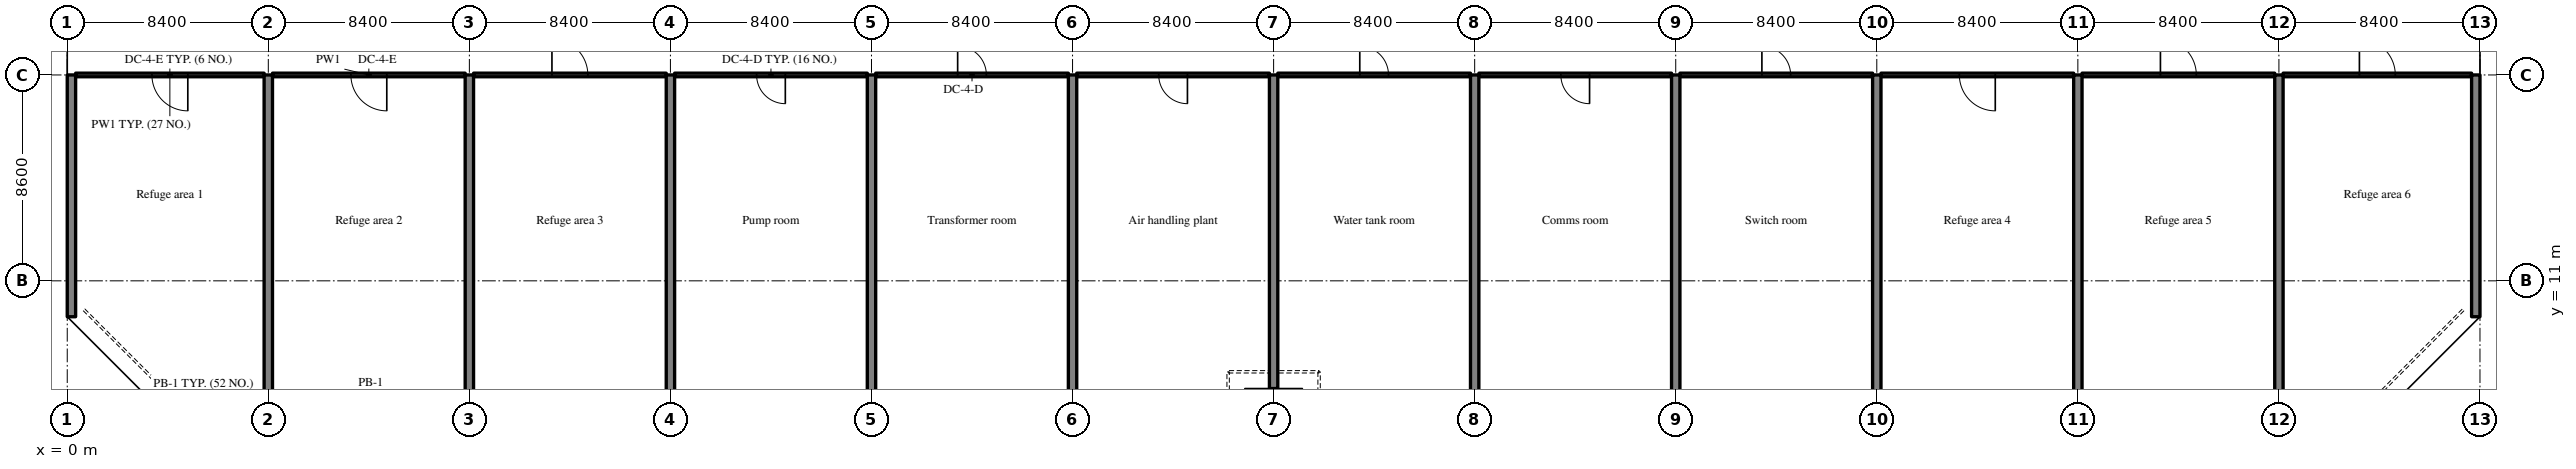
"""IFC4 building model, lengths in metres.
Left out: names, types, materials, properties, quantities, classifications, styles, units other than length and angle.
Written with IfcOpenShell. Run it as: python <this file> out.ifc"""

import sys

from ifc_helpers import new_model, si_unit, direction, frame, frame_2d, origin, place, context, subcontext, project, spatial, rectangle, extrude, source, transform, mapped, element, fill, save


model = new_model("IFC4")
c1 = context("Model", 3, precision=1e-05, world=origin(), true_north=direction((0.0, 1.0)))
c2 = subcontext(c1, "Body", "Model", "MODEL_VIEW")
j1 = project(units=[si_unit("LENGTHUNIT", "METRE"), si_unit("PLANEANGLEUNIT", "RADIAN")], contexts=[c1])
p1 = place(None, origin())
s1 = spatial("IfcSite", under=j1, at=p1, CompositionType="ELEMENT")
p2 = place(p1, origin())
s2 = spatial("IfcBuilding", under=s1, at=p2, CompositionType="ELEMENT")
p3 = place(p2, frame((0.0, 0.0, 140.8)))
s3 = spatial("IfcBuildingStorey", under=s2, at=p3, CompositionType="ELEMENT", Elevation=140.8)
m1 = source(origin(), c2, "Body", "SweptSolid", [
    extrude(rectangle(XDim=10.1, YDim=0.35, at=frame_2d((5.05, 0.0))), origin(), (0.0, 0.0, 1.0), 5.12),
])
p4 = place(p3, frame((0.175, 9.5, 0.0), z_axis=(0.0, 0.0, 1.0), x_axis=(0.0, 1.0, 0.0)))
e1 = element("IfcWall", 1, at=p4, inside=s3, PredefinedType="SHEAR", context=c2, shape_type="MappedRepresentation", body=[
    mapped(m1, transform((0.0, 0.0, 0.0), scale=1.0)),
])
m2 = source(origin(), c2, "Body", "SweptSolid", [
    extrude(rectangle(XDim=14.1, YDim=0.35, at=frame_2d((7.05, 0.0))), origin(), (0.0, 0.0, 1.0), 5.12),
])
for number, where, z_axis, x_axis in (
    (2, (8.4, 5.5, 0.0), (0.0, 0.0, 1.0), (0.0, 1.0, 0.0)),
    (3, (16.8, 5.5, 0.0), (0.0, 0.0, 1.0), (0.0, 1.0, 0.0)),
    (4, (25.2, 5.5, 0.0), (0.0, 0.0, 1.0), (0.0, 1.0, 0.0)),
    (5, (33.6, 5.5, 0.0), (0.0, 0.0, 1.0), (0.0, 1.0, 0.0)),
    (6, (42.0, 5.5, 0.0), (0.0, 0.0, 1.0), (0.0, 1.0, 0.0)),
):
    element("IfcWall", number, at=place(p3, frame(where, z_axis=z_axis, x_axis=x_axis)), inside=s3, PredefinedType="SHEAR", context=c2, shape_type="MappedRepresentation", body=[
        mapped(m2, transform((0.0, 0.0, 0.0), scale=1.0)),
    ])
m3 = source(origin(), c2, "Body", "SweptSolid", [
    extrude(rectangle(XDim=13.1, YDim=0.35, at=frame_2d((6.55, 0.0))), origin(), (0.0, 0.0, 1.0), 5.12),
])
p5 = place(p3, frame((50.4, 6.5, 0.0), z_axis=(0.0, 0.0, 1.0), x_axis=(0.0, 1.0, 0.0)))
e7 = element("IfcWall", 7, at=p5, inside=s3, PredefinedType="SHEAR", context=c2, shape_type="MappedRepresentation", body=[
    mapped(m3, transform((0.0, 0.0, 0.0), scale=1.0)),
])
for number, where, z_axis, x_axis in (
    (8, (58.8, 5.5, 0.0), (0.0, 0.0, 1.0), (0.0, 1.0, 0.0)),
    (9, (67.2, 5.5, 0.0), (0.0, 0.0, 1.0), (0.0, 1.0, 0.0)),
    (10, (75.6, 5.5, 0.0), (0.0, 0.0, 1.0), (0.0, 1.0, 0.0)),
    (11, (84.0, 5.5, 0.0), (0.0, 0.0, 1.0), (0.0, 1.0, 0.0)),
    (12, (92.4, 5.5, 0.0), (0.0, 0.0, 1.0), (0.0, 1.0, 0.0)),
):
    element("IfcWall", number, at=place(p3, frame(where, z_axis=z_axis, x_axis=x_axis)), inside=s3, PredefinedType="SHEAR", context=c2, shape_type="MappedRepresentation", body=[
        mapped(m2, transform((0.0, 0.0, 0.0), scale=1.0)),
    ])
p6 = place(p3, frame((100.625, 9.5, 0.0), z_axis=(0.0, 0.0, 1.0), x_axis=(0.0, 1.0, 0.0)))
e13 = element("IfcWall", 13, at=p6, inside=s3, PredefinedType="SHEAR", context=c2, shape_type="MappedRepresentation", body=[
    mapped(m1, transform((0.0, 0.0, 0.0), scale=1.0)),
])
m4 = source(origin(), c2, "Body", "SweptSolid", [
    extrude(rectangle(XDim=7.875, YDim=0.15, at=frame_2d((3.938, 0.0))), origin(), (0.0, 0.0, 1.0), 4.37),
])
p7 = place(p3, frame((0.35, 19.6, 0.0), z_axis=(0.0, 0.0, 1.0), x_axis=(1.0, 0.0, 0.0)))
e14 = element("IfcWall", 14, at=p7, inside=s3, PredefinedType="PARTITIONING", context=c2, shape_type="MappedRepresentation", body=[
    mapped(m4, transform((0.0, 0.0, 0.0), scale=1.0)),
])
m5 = source(origin(), c2, "Body", "SweptSolid", [
    extrude(rectangle(XDim=1.5, YDim=2.1, at=frame_2d((0.75, 1.05))), frame((0.0, 0.085, 0.0), z_axis=(0.0, -1.0, 0.0), x_axis=(1.0, 0.0, 0.0)), (0.0, 0.0, 1.0), 0.17),
])
p8 = place(p7, frame((3.187, 0.0, 0.0)))
e15 = element("IfcOpeningElement", 15, at=p8, cuts=e14, PredefinedType="OPENING", context=c2, shape_type="MappedRepresentation", body=[
    mapped(m5, transform((0.0, 0.0, 0.0), scale=1.0)),
])
m6 = source(origin(), c2, "Body", "SweptSolid", [
    extrude(rectangle(XDim=8.05, YDim=0.15, at=frame_2d((4.025, 0.0))), origin(), (0.0, 0.0, 1.0), 4.37),
])
p9 = place(p3, frame((8.575, 19.6, 0.0), z_axis=(0.0, 0.0, 1.0), x_axis=(1.0, 0.0, 0.0)))
e16 = element("IfcWall", 16, at=p9, inside=s3, PredefinedType="PARTITIONING", context=c2, shape_type="MappedRepresentation", body=[
    mapped(m6, transform((0.0, 0.0, 0.0), scale=1.0)),
])
p10 = place(p9, frame((3.275, 0.0, 0.0)))
e17 = element("IfcOpeningElement", 17, at=p10, cuts=e16, PredefinedType="OPENING", context=c2, shape_type="MappedRepresentation", body=[
    mapped(m5, transform((0.0, 0.0, 0.0), scale=1.0)),
])
m7 = source(origin(), c2, "Body", "SweptSolid", [
    extrude(rectangle(XDim=8.05, YDim=0.15, at=frame_2d((4.025, 0.0))), origin(), (0.0, 0.0, 1.0), 4.37),
])
p11 = place(p3, frame((16.975, 19.6, 0.0), z_axis=(0.0, 0.0, 1.0), x_axis=(1.0, 0.0, 0.0)))
e18 = element("IfcWall", 18, at=p11, inside=s3, PredefinedType="PARTITIONING", context=c2, shape_type="MappedRepresentation", body=[
    mapped(m7, transform((0.0, 0.0, 0.0), scale=1.0)),
])
p12 = place(p11, frame((3.275, 0.0, 0.0)))
e19 = element("IfcOpeningElement", 19, at=p12, cuts=e18, PredefinedType="OPENING", context=c2, shape_type="MappedRepresentation", body=[
    mapped(m5, transform((0.0, 0.0, 0.0), scale=1.0)),
])
p13 = place(p3, frame((25.375, 19.6, 0.0), z_axis=(0.0, 0.0, 1.0), x_axis=(1.0, 0.0, 0.0)))
e20 = element("IfcWall", 20, at=p13, inside=s3, PredefinedType="PARTITIONING", context=c2, shape_type="MappedRepresentation", body=[
    mapped(m6, transform((0.0, 0.0, 0.0), scale=1.0)),
])
m8 = source(origin(), c2, "Body", "SweptSolid", [
    extrude(rectangle(XDim=1.2, YDim=2.1, at=frame_2d((0.6, 1.05))), frame((0.0, 0.085, 0.0), z_axis=(0.0, -1.0, 0.0), x_axis=(1.0, 0.0, 0.0)), (0.0, 0.0, 1.0), 0.17),
])
p14 = place(p13, frame((3.425, 0.0, 0.0)))
e21 = element("IfcOpeningElement", 21, at=p14, cuts=e20, PredefinedType="OPENING", context=c2, shape_type="MappedRepresentation", body=[
    mapped(m8, transform((0.0, 0.0, 0.0), scale=1.0)),
])
p15 = place(p3, frame((33.775, 19.6, 0.0), z_axis=(0.0, 0.0, 1.0), x_axis=(1.0, 0.0, 0.0)))
e22 = element("IfcWall", 22, at=p15, inside=s3, PredefinedType="PARTITIONING", context=c2, shape_type="MappedRepresentation", body=[
    mapped(m6, transform((0.0, 0.0, 0.0), scale=1.0)),
])
p16 = place(p15, frame((3.425, 0.0, 0.0)))
e23 = element("IfcOpeningElement", 23, at=p16, cuts=e22, PredefinedType="OPENING", context=c2, shape_type="MappedRepresentation", body=[
    mapped(m8, transform((0.0, 0.0, 0.0), scale=1.0)),
])
p17 = place(p3, frame((42.175, 19.6, 0.0), z_axis=(0.0, 0.0, 1.0), x_axis=(1.0, 0.0, 0.0)))
e24 = element("IfcWall", 24, at=p17, inside=s3, PredefinedType="PARTITIONING", context=c2, shape_type="MappedRepresentation", body=[
    mapped(m6, transform((0.0, 0.0, 0.0), scale=1.0)),
])
p18 = place(p17, frame((3.425, 0.0, 0.0)))
e25 = element("IfcOpeningElement", 25, at=p18, cuts=e24, PredefinedType="OPENING", context=c2, shape_type="MappedRepresentation", body=[
    mapped(m8, transform((0.0, 0.0, 0.0), scale=1.0)),
])
p19 = place(p3, frame((50.575, 19.6, 0.0), z_axis=(0.0, 0.0, 1.0), x_axis=(1.0, 0.0, 0.0)))
e26 = element("IfcWall", 26, at=p19, inside=s3, PredefinedType="PARTITIONING", context=c2, shape_type="MappedRepresentation", body=[
    mapped(m6, transform((0.0, 0.0, 0.0), scale=1.0)),
])
p20 = place(p19, frame((3.425, 0.0, 0.0)))
e27 = element("IfcOpeningElement", 27, at=p20, cuts=e26, PredefinedType="OPENING", context=c2, shape_type="MappedRepresentation", body=[
    mapped(m8, transform((0.0, 0.0, 0.0), scale=1.0)),
])
p21 = place(p3, frame((58.975, 19.6, 0.0), z_axis=(0.0, 0.0, 1.0), x_axis=(1.0, 0.0, 0.0)))
e28 = element("IfcWall", 28, at=p21, inside=s3, PredefinedType="PARTITIONING", context=c2, shape_type="MappedRepresentation", body=[
    mapped(m7, transform((0.0, 0.0, 0.0), scale=1.0)),
])
p22 = place(p21, frame((3.425, 0.0, 0.0)))
e29 = element("IfcOpeningElement", 29, at=p22, cuts=e28, PredefinedType="OPENING", context=c2, shape_type="MappedRepresentation", body=[
    mapped(m8, transform((0.0, 0.0, 0.0), scale=1.0)),
])
p23 = place(p3, frame((67.375, 19.6, 0.0), z_axis=(0.0, 0.0, 1.0), x_axis=(1.0, 0.0, 0.0)))
e30 = element("IfcWall", 30, at=p23, inside=s3, PredefinedType="PARTITIONING", context=c2, shape_type="MappedRepresentation", body=[
    mapped(m6, transform((0.0, 0.0, 0.0), scale=1.0)),
])
p24 = place(p23, frame((3.425, 0.0, 0.0)))
e31 = element("IfcOpeningElement", 31, at=p24, cuts=e30, PredefinedType="OPENING", context=c2, shape_type="MappedRepresentation", body=[
    mapped(m8, transform((0.0, 0.0, 0.0), scale=1.0)),
])
p25 = place(p3, frame((75.775, 19.6, 0.0), z_axis=(0.0, 0.0, 1.0), x_axis=(1.0, 0.0, 0.0)))
e32 = element("IfcWall", 32, at=p25, inside=s3, PredefinedType="PARTITIONING", context=c2, shape_type="MappedRepresentation", body=[
    mapped(m6, transform((0.0, 0.0, 0.0), scale=1.0)),
])
p26 = place(p25, frame((3.275, 0.0, 0.0)))
e33 = element("IfcOpeningElement", 33, at=p26, cuts=e32, PredefinedType="OPENING", context=c2, shape_type="MappedRepresentation", body=[
    mapped(m5, transform((0.0, 0.0, 0.0), scale=1.0)),
])
p27 = place(p3, frame((84.175, 19.6, 0.0), z_axis=(0.0, 0.0, 1.0), x_axis=(1.0, 0.0, 0.0)))
e34 = element("IfcWall", 34, at=p27, inside=s3, PredefinedType="PARTITIONING", context=c2, shape_type="MappedRepresentation", body=[
    mapped(m6, transform((0.0, 0.0, 0.0), scale=1.0)),
])
p28 = place(p27, frame((3.275, 0.0, 0.0)))
e35 = element("IfcOpeningElement", 35, at=p28, cuts=e34, PredefinedType="OPENING", context=c2, shape_type="MappedRepresentation", body=[
    mapped(m5, transform((0.0, 0.0, 0.0), scale=1.0)),
])
p29 = place(p3, frame((92.575, 19.6, 0.0), z_axis=(0.0, 0.0, 1.0), x_axis=(1.0, 0.0, 0.0)))
e36 = element("IfcWall", 36, at=p29, inside=s3, PredefinedType="PARTITIONING", context=c2, shape_type="MappedRepresentation", body=[
    mapped(m4, transform((0.0, 0.0, 0.0), scale=1.0)),
])
p30 = place(p29, frame((3.188, 0.0, 0.0)))
e37 = element("IfcOpeningElement", 37, at=p30, cuts=e36, PredefinedType="OPENING", context=c2, shape_type="MappedRepresentation", body=[
    mapped(m5, transform((0.0, 0.0, 0.0), scale=1.0)),
])
m9 = source(origin(), c2, "Body", "SweptSolid", [
    extrude(rectangle(XDim=1.5, YDim=2.1, at=frame_2d((0.75, 1.05))), frame((0.0, 0.025, 0.0), z_axis=(0.0, -1.0, 0.0), x_axis=(1.0, 0.0, 0.0)), (0.0, 0.0, 1.0), 0.05),
])
p31 = place(p8, origin())
e38 = element("IfcDoor", 38, at=p31, inside=s3, OperationType="SINGLE_SWING_RIGHT", PredefinedType="DOOR", context=c2, shape_type="MappedRepresentation", body=[
    mapped(m9, transform((0.0, 0.0, 0.0), scale=1.0)),
])
fill(e15, e38)
p32 = place(p10, origin())
e39 = element("IfcDoor", 39, at=p32, inside=s3, OperationType="SINGLE_SWING_RIGHT", PredefinedType="DOOR", context=c2, shape_type="MappedRepresentation", body=[
    mapped(m9, transform((0.0, 0.0, 0.0), scale=1.0)),
])
fill(e17, e39)
p33 = place(p12, origin())
e40 = element("IfcDoor", 40, at=p33, inside=s3, OperationType="SINGLE_SWING_LEFT", PredefinedType="DOOR", context=c2, shape_type="MappedRepresentation", body=[
    mapped(m9, transform((0.0, 0.0, 0.0), scale=1.0)),
])
fill(e19, e40)
m10 = source(origin(), c2, "Body", "SweptSolid", [
    extrude(rectangle(XDim=1.2, YDim=2.1, at=frame_2d((0.6, 1.05))), frame((0.0, 0.025, 0.0), z_axis=(0.0, -1.0, 0.0), x_axis=(1.0, 0.0, 0.0)), (0.0, 0.0, 1.0), 0.05),
])
p34 = place(p14, origin())
e41 = element("IfcDoor", 41, at=p34, inside=s3, OperationType="SINGLE_SWING_RIGHT", PredefinedType="DOOR", context=c2, shape_type="MappedRepresentation", body=[
    mapped(m10, transform((0.0, 0.0, 0.0), scale=1.0)),
])
fill(e21, e41)
p35 = place(p16, origin())
e42 = element("IfcDoor", 42, at=p35, inside=s3, OperationType="SINGLE_SWING_LEFT", PredefinedType="DOOR", context=c2, shape_type="MappedRepresentation", body=[
    mapped(m10, transform((0.0, 0.0, 0.0), scale=1.0)),
])
fill(e23, e42)
p36 = place(p18, origin())
e43 = element("IfcDoor", 43, at=p36, inside=s3, OperationType="SINGLE_SWING_RIGHT", PredefinedType="DOOR", context=c2, shape_type="MappedRepresentation", body=[
    mapped(m10, transform((0.0, 0.0, 0.0), scale=1.0)),
])
fill(e25, e43)
p37 = place(p20, origin())
e44 = element("IfcDoor", 44, at=p37, inside=s3, OperationType="SINGLE_SWING_LEFT", PredefinedType="DOOR", context=c2, shape_type="MappedRepresentation", body=[
    mapped(m10, transform((0.0, 0.0, 0.0), scale=1.0)),
])
fill(e27, e44)
p38 = place(p22, origin())
e45 = element("IfcDoor", 45, at=p38, inside=s3, OperationType="SINGLE_SWING_RIGHT", PredefinedType="DOOR", context=c2, shape_type="MappedRepresentation", body=[
    mapped(m10, transform((0.0, 0.0, 0.0), scale=1.0)),
])
fill(e29, e45)
p39 = place(p24, origin())
e46 = element("IfcDoor", 46, at=p39, inside=s3, OperationType="SINGLE_SWING_LEFT", PredefinedType="DOOR", context=c2, shape_type="MappedRepresentation", body=[
    mapped(m10, transform((0.0, 0.0, 0.0), scale=1.0)),
])
fill(e31, e46)
p40 = place(p26, origin())
e47 = element("IfcDoor", 47, at=p40, inside=s3, OperationType="SINGLE_SWING_RIGHT", PredefinedType="DOOR", context=c2, shape_type="MappedRepresentation", body=[
    mapped(m9, transform((0.0, 0.0, 0.0), scale=1.0)),
])
fill(e33, e47)
p41 = place(p28, origin())
e48 = element("IfcDoor", 48, at=p41, inside=s3, OperationType="SINGLE_SWING_LEFT", PredefinedType="DOOR", context=c2, shape_type="MappedRepresentation", body=[
    mapped(m9, transform((0.0, 0.0, 0.0), scale=1.0)),
])
fill(e35, e48)
p42 = place(p30, origin())
e49 = element("IfcDoor", 49, at=p42, inside=s3, OperationType="SINGLE_SWING_LEFT", PredefinedType="DOOR", context=c2, shape_type="MappedRepresentation", body=[
    mapped(m9, transform((0.0, 0.0, 0.0), scale=1.0)),
])
fill(e37, e49)
save(model, sys.argv[1])
